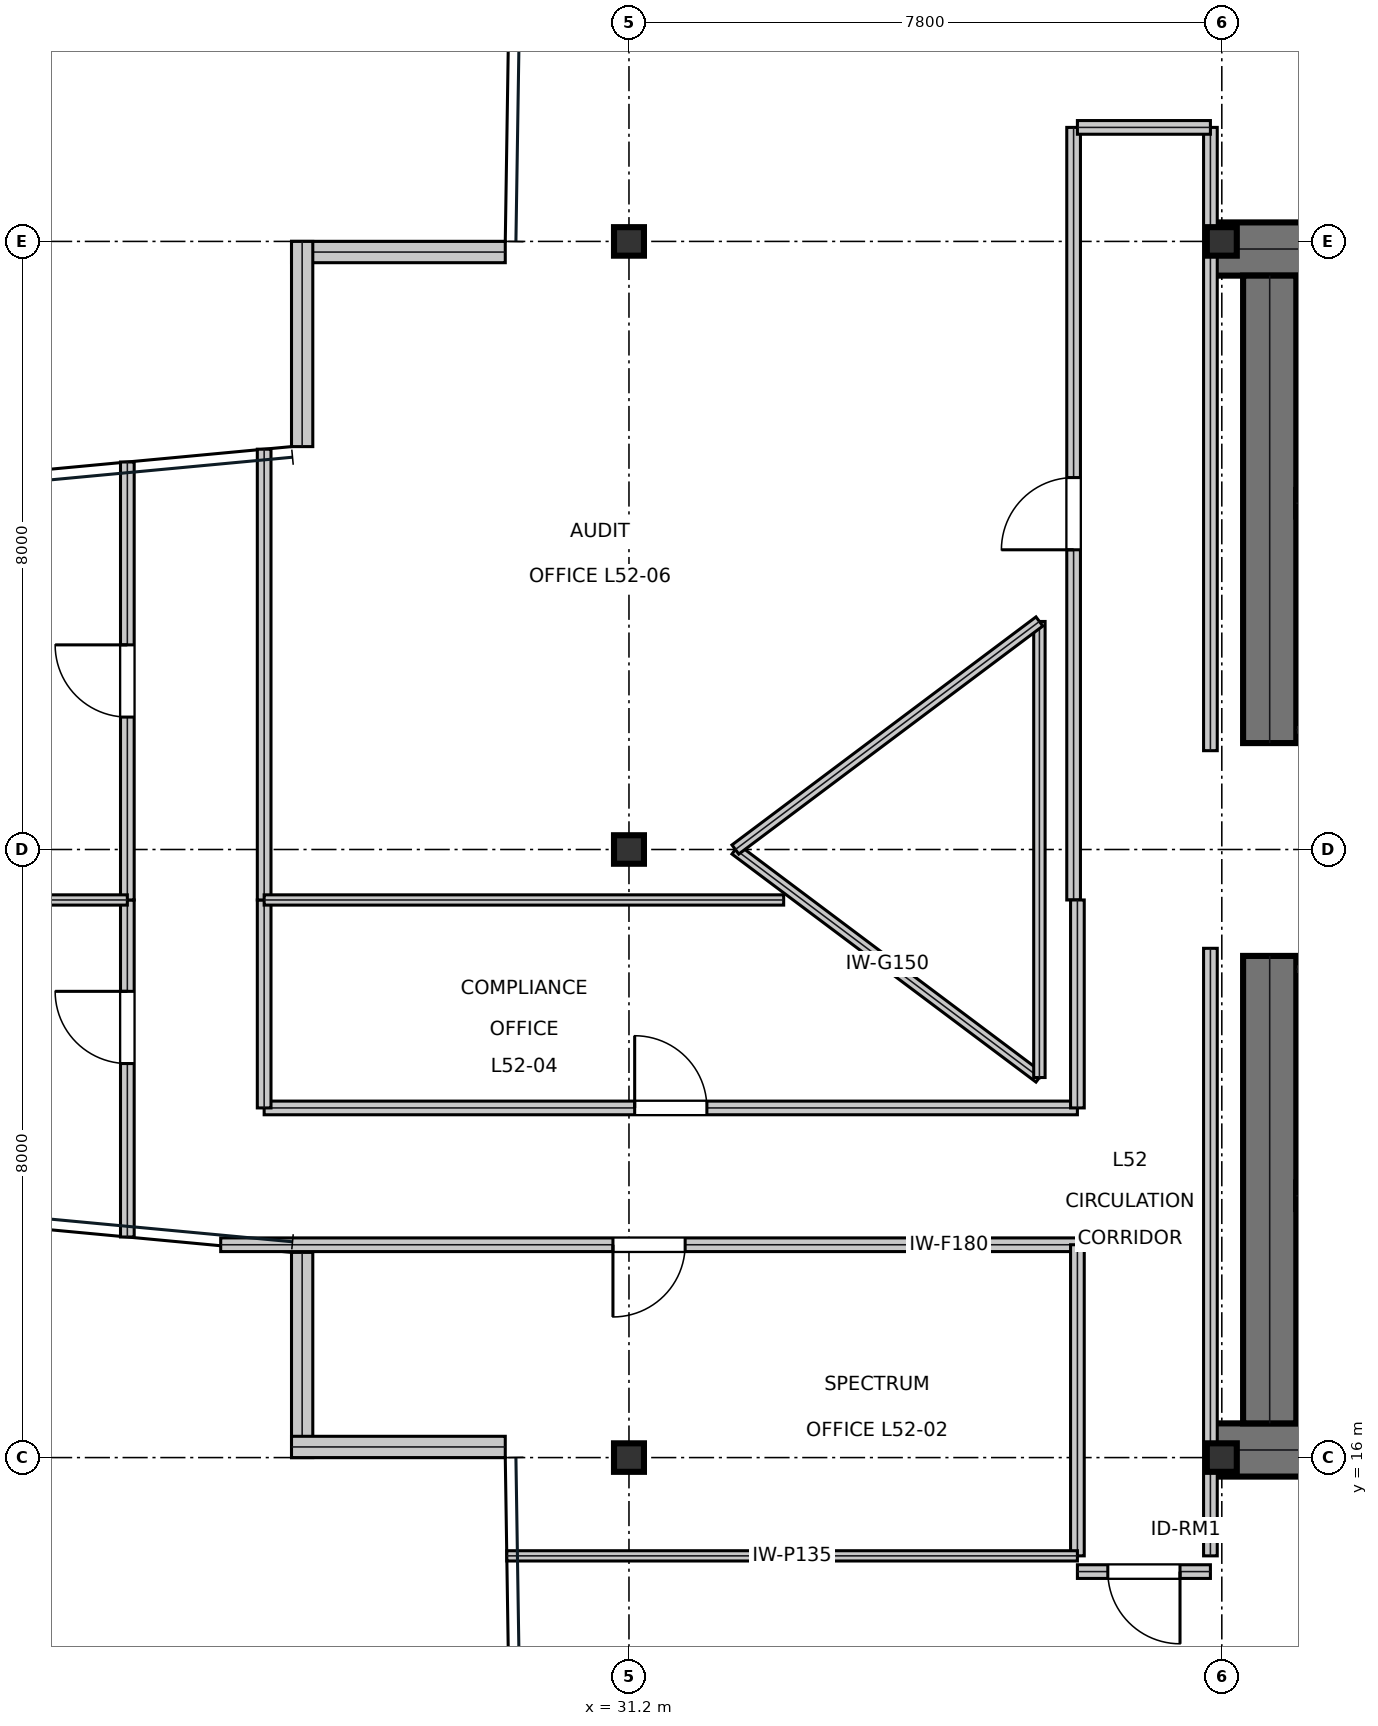
"""IFC4 building model, lengths in metres.
Left out: names, types, materials, properties, quantities, classifications, styles, units other than length and angle.
Written with IfcOpenShell. Run it as: python <this file> out.ifc"""

import sys

from ifc_helpers import new_model, si_unit, direction, frame, frame_2d, origin, origin_2d, place, context, subcontext, project, spatial, rectangle, i_section, extrude, element, fill, save


model = new_model("IFC4")
c1 = context("Model", 3, precision=1e-05, world=origin(), true_north=direction((0.0, 1.0)))
c2 = subcontext(c1, "Body", "Model", "MODEL_VIEW")
j1 = project(units=[si_unit("LENGTHUNIT", "METRE"), si_unit("PLANEANGLEUNIT", "RADIAN")], contexts=[c1])
p1 = place(None, origin())
s1 = spatial("IfcSite", under=j1, at=p1, CompositionType="ELEMENT")
p2 = place(p1, origin())
s2 = spatial("IfcBuilding", under=s1, at=p2, CompositionType="ELEMENT")
p3 = place(p2, frame((0.0, 0.0, 224.25)))
s3 = spatial("IfcBuildingStorey", under=s2, at=p3, CompositionType="ELEMENT", Elevation=224.25)
for number, where, z_axis, x_axis in (
    (1, (38.8, 31.9, 0.0), (0.0, 0.0, 1.0), (1.0, 0.0, 0.0)),
    (2, (38.8, 16.1, 0.0), (0.0, 0.0, 1.0), (1.0, 0.0, 0.0)),
):
    element("IfcWall", number, at=place(p3, frame(where, z_axis=z_axis, x_axis=x_axis)), inside=s3, PredefinedType="SHEAR", context=c2, shape_type="SweptSolid", body=[
        extrude(rectangle(XDim=16.0, YDim=0.7, at=frame_2d((8.0, 0.0))), origin(), (0.0, 0.0, 1.0), 3.79),
    ])
for number, where, z_axis, x_axis in (
    (3, (39.63, 16.45, 0.0), (0.0, 0.0, 1.0), (0.0, 1.0, 0.0)),
    (4, (39.63, 25.4, 0.0), (0.0, 0.0, 1.0), (0.0, 1.0, 0.0)),
):
    element("IfcWall", number, at=place(p3, frame(where, z_axis=z_axis, x_axis=x_axis)), inside=s3, PredefinedType="SHEAR", context=c2, shape_type="SweptSolid", body=[
        extrude(rectangle(XDim=6.15, YDim=0.7, at=frame_2d((3.075, 0.0))), origin(), (0.0, 0.0, 1.0), 3.79),
    ])
p4 = place(p3, frame((39.98, 28.555, 0.0), z_axis=(0.0, 0.0, 1.0), x_axis=(1.0, 0.0, 0.0)))
e5 = element("IfcWall", 5, at=p4, inside=s3, PredefinedType="SHEAR", context=c2, shape_type="SweptSolid", body=[
    extrude(rectangle(XDim=7.71, YDim=0.35, at=frame_2d((3.855, 0.0))), origin(), (0.0, 0.0, 1.0), 3.79),
])
p5 = place(p4, frame((0.25, 0.0, 0.0)))
e6 = element("IfcOpeningElement", 6, at=p5, cuts=e5, PredefinedType="OPENING", context=c2, shape_type="SweptSolid", body=[
    extrude(rectangle(XDim=1.1, YDim=2.15, at=frame_2d((0.55, 1.075))), frame((0.0, 0.185, 0.0), z_axis=(0.0, -1.0, 0.0), x_axis=(1.0, 0.0, 0.0)), (0.0, 0.0, 1.0), 0.37),
])
p6 = place(p3, frame((39.98, 19.445, 0.0), z_axis=(0.0, 0.0, 1.0), x_axis=(1.0, 0.0, 0.0)))
e7 = element("IfcWall", 7, at=p6, inside=s3, PredefinedType="SHEAR", context=c2, shape_type="SweptSolid", body=[
    extrude(rectangle(XDim=7.71, YDim=0.35, at=frame_2d((3.855, 0.0))), origin(), (0.0, 0.0, 1.0), 3.79),
])
p7 = place(p6, frame((0.25, 0.0, 0.0)))
e8 = element("IfcOpeningElement", 8, at=p7, cuts=e7, PredefinedType="OPENING", context=c2, shape_type="SweptSolid", body=[
    extrude(rectangle(XDim=1.1, YDim=2.15, at=frame_2d((0.55, 1.075))), frame((0.0, 0.185, 0.0), z_axis=(0.0, -1.0, 0.0), x_axis=(1.0, 0.0, 0.0)), (0.0, 0.0, 1.0), 0.37),
])
for number, where, z_axis, x_axis in (
    (9, (31.2, 16.0, 0.0), (0.0, 0.0, 1.0), (1.0, 0.0, 0.0)),
    (10, (31.2, 24.0, 0.0), (0.0, 0.0, 1.0), (1.0, 0.0, 0.0)),
    (11, (31.2, 32.0, 0.0), (0.0, 0.0, 1.0), (1.0, 0.0, 0.0)),
    (12, (39.0, 16.0, 0.0), (0.0, 0.0, 1.0), (1.0, 0.0, 0.0)),
    (13, (39.0, 32.0, 0.0), (0.0, 0.0, 1.0), (1.0, 0.0, 0.0)),
):
    element("IfcColumn", number, at=place(p3, frame(where, z_axis=z_axis, x_axis=x_axis)), inside=s3, PredefinedType="COLUMN", context=c2, shape_type="SweptSolid", body=[
        extrude(i_section(OverallWidth=0.394, OverallDepth=0.375, WebThickness=0.017, FlangeThickness=0.028, at=origin_2d()), origin(), (0.0, 0.0, 1.0), 4.044),
    ])
p8 = place(p3, frame((29.573, 31.86, 0.0), z_axis=(0.0, 0.0, 1.0), x_axis=(-1.0, 0.0, 0.0)))
e14 = element("IfcWall", 14, at=p8, inside=s3, PredefinedType="STANDARD", context=c2, shape_type="SweptSolid", body=[
    extrude(rectangle(XDim=2.812, YDim=0.28, at=frame_2d((1.406, 0.0))), origin(), (0.0, 0.0, 1.0), 3.79),
])
for number, where, z_axis, x_axis in (
    (15, (26.9, 32.0, 0.0), (0.0, 0.0, 1.0), (0.0, -1.0, 0.0)),
    (16, (26.9, 18.7, 0.0), (0.0, 0.0, 1.0), (0.0, -1.0, 0.0)),
):
    element("IfcWall", number, at=place(p3, frame(where, z_axis=z_axis, x_axis=x_axis)), inside=s3, PredefinedType="STANDARD", context=c2, shape_type="SweptSolid", body=[
        extrude(rectangle(XDim=2.7, YDim=0.28, at=frame_2d((1.35, 0.0))), origin(), (0.0, 0.0, 1.0), 3.319),
    ])
p9 = place(p3, frame((26.76, 16.14, 0.0), z_axis=(0.0, 0.0, 1.0), x_axis=(1.0, 0.0, 0.0)))
e17 = element("IfcWall", 17, at=p9, inside=s3, PredefinedType="STANDARD", context=c2, shape_type="SweptSolid", body=[
    extrude(rectangle(XDim=2.812, YDim=0.28, at=frame_2d((1.406, 0.0))), origin(), (0.0, 0.0, 1.0), 3.79),
])
p10 = place(p3, frame((39.98, 25.575, 0.0), z_axis=(0.0, 0.0, 1.0), x_axis=(1.0, 0.0, 0.0)))
e18 = element("IfcWall", 18, at=p10, inside=s3, PredefinedType="PARTITIONING", context=c2, shape_type="SweptSolid", body=[
    extrude(rectangle(XDim=5.9, YDim=0.15, at=frame_2d((2.95, 0.0))), origin(), (0.0, 0.0, 1.0), 3.79),
])
p11 = place(p10, frame((2.35, 0.0, 0.0)))
e19 = element("IfcOpeningElement", 19, at=p11, cuts=e18, PredefinedType="OPENING", context=c2, shape_type="SweptSolid", body=[
    extrude(rectangle(XDim=1.05, YDim=2.15, at=frame_2d((0.525, 1.075))), frame((0.0, 0.085, 0.0), z_axis=(0.0, -1.0, 0.0), x_axis=(1.0, 0.0, 0.0)), (0.0, 0.0, 1.0), 0.17),
])
p12 = place(p3, frame((39.98, 22.425, 0.0), z_axis=(0.0, 0.0, 1.0), x_axis=(1.0, 0.0, 0.0)))
e20 = element("IfcWall", 20, at=p12, inside=s3, PredefinedType="PARTITIONING", context=c2, shape_type="SweptSolid", body=[
    extrude(rectangle(XDim=5.9, YDim=0.15, at=frame_2d((2.95, 0.0))), origin(), (0.0, 0.0, 1.0), 3.79),
])
p13 = place(p12, frame((2.35, 0.0, 0.0)))
e21 = element("IfcOpeningElement", 21, at=p13, cuts=e20, PredefinedType="OPENING", context=c2, shape_type="SweptSolid", body=[
    extrude(rectangle(XDim=1.05, YDim=2.15, at=frame_2d((0.525, 1.075))), frame((0.0, 0.085, 0.0), z_axis=(0.0, -1.0, 0.0), x_axis=(1.0, 0.0, 0.0)), (0.0, 0.0, 1.0), 0.17),
])
p14 = place(p3, frame((37.1, 14.5, 0.0), z_axis=(0.0, 0.0, 1.0), x_axis=(1.0, 0.0, 0.0)))
e22 = element("IfcWall", 22, at=p14, inside=s3, PredefinedType="SOLIDWALL", context=c2, shape_type="SweptSolid", body=[
    extrude(rectangle(XDim=1.75, YDim=0.18, at=frame_2d((0.875, 0.0))), origin(), (0.0, 0.0, 1.0), 3.241),
])
p15 = place(p14, frame((0.4, 0.0, 0.0)))
e23 = element("IfcOpeningElement", 23, at=p15, cuts=e22, PredefinedType="OPENING", context=c2, shape_type="SweptSolid", body=[
    extrude(rectangle(XDim=0.95, YDim=2.15, at=frame_2d((0.475, 1.075))), frame((0.0, 0.1, 0.0), z_axis=(0.0, -1.0, 0.0), x_axis=(1.0, 0.0, 0.0)), (0.0, 0.0, 1.0), 0.2),
])
p16 = place(p3, frame((25.828, 18.8, 0.0), z_axis=(0.0, 0.0, 1.0), x_axis=(1.0, 0.0, 0.0)))
e24 = element("IfcWall", 24, at=p16, inside=s3, PredefinedType="SOLIDWALL", context=c2, shape_type="SweptSolid", body=[
    extrude(rectangle(XDim=11.272, YDim=0.18, at=frame_2d((5.636, 0.0))), origin(), (0.0, 0.0, 1.0), 3.241),
])
p17 = place(p16, frame((5.161, 0.0, 0.0)))
e25 = element("IfcOpeningElement", 25, at=p17, cuts=e24, PredefinedType="OPENING", context=c2, shape_type="SweptSolid", body=[
    extrude(rectangle(XDim=0.95, YDim=2.15, at=frame_2d((0.475, 1.075))), frame((0.0, 0.1, 0.0), z_axis=(0.0, -1.0, 0.0), x_axis=(1.0, 0.0, 0.0)), (0.0, 0.0, 1.0), 0.2),
])
p18 = place(p3, frame((24.6, 18.902, 0.0), z_axis=(0.0, 0.0, 1.0), x_axis=(0.0, 1.0, 0.0)))
e26 = element("IfcWall", 26, at=p18, inside=s3, PredefinedType="SOLIDWALL", context=c2, shape_type="SweptSolid", body=[
    extrude(rectangle(XDim=4.434, YDim=0.18, at=frame_2d((2.217, 0.0))), origin(), (0.0, 0.0, 1.0), 3.241),
])
p19 = place(p18, frame((2.282, 0.0, 0.0)))
e27 = element("IfcOpeningElement", 27, at=p19, cuts=e26, PredefinedType="OPENING", context=c2, shape_type="SweptSolid", body=[
    extrude(rectangle(XDim=0.95, YDim=2.15, at=frame_2d((0.475, 1.075))), frame((0.0, 0.1, 0.0), z_axis=(0.0, -1.0, 0.0), x_axis=(1.0, 0.0, 0.0)), (0.0, 0.0, 1.0), 0.2),
])
p20 = place(p3, frame((26.4, 20.6, 0.0), z_axis=(0.0, 0.0, 1.0), x_axis=(1.0, 0.0, 0.0)))
e28 = element("IfcWall", 28, at=p20, inside=s3, PredefinedType="SOLIDWALL", context=c2, shape_type="SweptSolid", body=[
    extrude(rectangle(XDim=10.7, YDim=0.18, at=frame_2d((5.35, 0.0))), origin(), (0.0, 0.0, 1.0), 3.241),
])
p21 = place(p20, frame((4.875, 0.0, 0.0)))
e29 = element("IfcOpeningElement", 29, at=p21, cuts=e28, PredefinedType="OPENING", context=c2, shape_type="SweptSolid", body=[
    extrude(rectangle(XDim=0.95, YDim=2.15, at=frame_2d((0.475, 1.075))), frame((0.0, 0.1, 0.0), z_axis=(0.0, -1.0, 0.0), x_axis=(1.0, 0.0, 0.0)), (0.0, 0.0, 1.0), 0.2),
])
p22 = place(p3, frame((24.6, 23.336, 0.0), z_axis=(0.0, 0.0, 1.0), x_axis=(0.0, 1.0, 0.0)))
e30 = element("IfcWall", 30, at=p22, inside=s3, PredefinedType="SOLIDWALL", context=c2, shape_type="SweptSolid", body=[
    extrude(rectangle(XDim=5.762, YDim=0.18, at=frame_2d((2.881, 0.0))), origin(), (0.0, 0.0, 1.0), 3.241),
])
p23 = place(p22, frame((2.406, 0.0, 0.0)))
e31 = element("IfcOpeningElement", 31, at=p23, cuts=e30, PredefinedType="OPENING", context=c2, shape_type="SweptSolid", body=[
    extrude(rectangle(XDim=0.95, YDim=2.15, at=frame_2d((0.475, 1.075))), frame((0.0, 0.1, 0.0), z_axis=(0.0, -1.0, 0.0), x_axis=(1.0, 0.0, 0.0)), (0.0, 0.0, 1.0), 0.2),
])
p24 = place(p3, frame((37.05, 23.336, 0.0), z_axis=(0.0, 0.0, 1.0), x_axis=(0.0, 1.0, 0.0)))
e32 = element("IfcWall", 32, at=p24, inside=s3, PredefinedType="SOLIDWALL", context=c2, shape_type="SweptSolid", body=[
    extrude(rectangle(XDim=10.164, YDim=0.18, at=frame_2d((5.082, 0.0))), origin(), (0.0, 0.0, 1.0), 3.241),
])
p25 = place(p24, frame((4.607, 0.0, 0.0)))
e33 = element("IfcOpeningElement", 33, at=p25, cuts=e32, PredefinedType="OPENING", context=c2, shape_type="SweptSolid", body=[
    extrude(rectangle(XDim=0.95, YDim=2.15, at=frame_2d((0.475, 1.075))), frame((0.0, 0.1, 0.0), z_axis=(0.0, -1.0, 0.0), x_axis=(1.0, 0.0, 0.0)), (0.0, 0.0, 1.0), 0.2),
])
p26 = place(p3, frame((38.85, 14.707, 0.0), z_axis=(0.0, 0.0, 1.0), x_axis=(0.0, 1.0, 0.0)))
e34 = element("IfcWall", 34, at=p26, inside=s3, PredefinedType="SOLIDWALL", context=c2, shape_type="SweptSolid", body=[
    extrude(rectangle(XDim=7.993, YDim=0.18, at=frame_2d((3.997, 0.0))), origin(), (0.0, 0.0, 1.0), 3.241),
])
p27 = place(p3, frame((37.1, 14.707, 0.0), z_axis=(0.0, 0.0, 1.0), x_axis=(0.0, 1.0, 0.0)))
e35 = element("IfcWall", 35, at=p27, inside=s3, PredefinedType="SOLIDWALL", context=c2, shape_type="SweptSolid", body=[
    extrude(rectangle(XDim=4.093, YDim=0.18, at=frame_2d((2.046, 0.0))), origin(), (0.0, 0.0, 1.0), 3.241),
])
p28 = place(p3, frame((26.4, 20.6, 0.0), z_axis=(0.0, 0.0, 1.0), x_axis=(0.0, 1.0, 0.0)))
e36 = element("IfcWall", 36, at=p28, inside=s3, PredefinedType="SOLIDWALL", context=c2, shape_type="SweptSolid", body=[
    extrude(rectangle(XDim=2.736, YDim=0.18, at=frame_2d((1.368, 0.0))), origin(), (0.0, 0.0, 1.0), 3.241),
])
p29 = place(p3, frame((37.1, 20.6, 0.0), z_axis=(0.0, 0.0, 1.0), x_axis=(0.0, 1.0, 0.0)))
e37 = element("IfcWall", 37, at=p29, inside=s3, PredefinedType="SOLIDWALL", context=c2, shape_type="SweptSolid", body=[
    extrude(rectangle(XDim=2.736, YDim=0.18, at=frame_2d((1.368, 0.0))), origin(), (0.0, 0.0, 1.0), 3.79),
])
p30 = place(p3, frame((38.85, 25.3, 0.0), z_axis=(0.0, 0.0, 1.0), x_axis=(0.0, 1.0, 0.0)))
e38 = element("IfcWall", 38, at=p30, inside=s3, PredefinedType="SOLIDWALL", context=c2, shape_type="SweptSolid", body=[
    extrude(rectangle(XDim=8.2, YDim=0.18, at=frame_2d((4.1, 0.0))), origin(), (0.0, 0.0, 1.0), 3.241),
])
p31 = place(p3, frame((26.4, 23.336, 0.0), z_axis=(0.0, 0.0, 1.0), x_axis=(0.0, 1.0, 0.0)))
e39 = element("IfcWall", 39, at=p31, inside=s3, PredefinedType="SOLIDWALL", context=c2, shape_type="SweptSolid", body=[
    extrude(rectangle(XDim=5.931, YDim=0.18, at=frame_2d((2.965, 0.0))), origin(), (0.0, 0.0, 1.0), 3.241),
])
p32 = place(p3, frame((37.1, 33.5, 0.0), z_axis=(0.0, 0.0, 1.0), x_axis=(1.0, 0.0, 0.0)))
e40 = element("IfcWall", 40, at=p32, inside=s3, PredefinedType="SOLIDWALL", context=c2, shape_type="SweptSolid", body=[
    extrude(rectangle(XDim=1.75, YDim=0.18, at=frame_2d((0.875, 0.0))), origin(), (0.0, 0.0, 1.0), 3.241),
])
p33 = place(p3, frame((29.592, 14.707, 0.0), z_axis=(0.0, 0.0, 1.0), x_axis=(1.0, 0.0, 0.0)))
e41 = element("IfcWall", 41, at=p33, inside=s3, PredefinedType="PARTITIONING", context=c2, shape_type="SweptSolid", body=[
    extrude(rectangle(XDim=7.508, YDim=0.135, at=frame_2d((3.754, 0.0))), origin(), (0.0, 0.0, 1.0), 3.319),
])
p34 = place(p3, frame((13.54, 23.336, 0.0), z_axis=(0.0, 0.0, 1.0), x_axis=(1.0, 0.0, 0.0)))
e42 = element("IfcWall", 42, at=p34, inside=s3, PredefinedType="PARTITIONING", context=c2, shape_type="SweptSolid", body=[
    extrude(rectangle(XDim=11.06, YDim=0.135, at=frame_2d((5.53, 0.0))), origin(), (0.0, 0.0, 1.0), 3.319),
])
p35 = place(p3, frame((26.4, 23.336, 0.0), z_axis=(0.0, 0.0, 1.0), x_axis=(1.0, 0.0, 0.0)))
e43 = element("IfcWall", 43, at=p35, inside=s3, PredefinedType="PARTITIONING", context=c2, shape_type="SweptSolid", body=[
    extrude(rectangle(XDim=6.835, YDim=0.135, at=frame_2d((3.418, 0.0))), origin(), (0.0, 0.0, 1.0), 3.241),
])
p36 = place(p3, frame((32.6, 24.0, 0.0), z_axis=(0.0, 0.0, 1.0), x_axis=(0.8, -0.6, 0.0)))
e44 = element("IfcWall", 44, at=p36, inside=s3, PredefinedType="MOVABLE", context=c2, shape_type="SweptSolid", body=[
    extrude(rectangle(XDim=5.0, YDim=0.15, at=frame_2d((2.5, 0.0))), origin(), (0.0, 0.0, 1.0), 3.79),
])
p37 = place(p3, frame((36.6, 21.0, 0.0), z_axis=(0.0, 0.0, 1.0), x_axis=(0.0, 1.0, 0.0)))
e45 = element("IfcWall", 45, at=p37, inside=s3, PredefinedType="MOVABLE", context=c2, shape_type="SweptSolid", body=[
    extrude(rectangle(XDim=6.0, YDim=0.15, at=frame_2d((3.0, 0.0))), origin(), (0.0, 0.0, 1.0), 3.79),
])
p38 = place(p3, frame((36.6, 27.0, 0.0), z_axis=(0.0, 0.0, 1.0), x_axis=(-0.8, -0.6, 0.0)))
e46 = element("IfcWall", 46, at=p38, inside=s3, PredefinedType="MOVABLE", context=c2, shape_type="SweptSolid", body=[
    extrude(rectangle(XDim=5.0, YDim=0.15, at=frame_2d((2.5, 0.0))), origin(), (0.0, 0.0, 1.0), 3.79),
])
p39 = place(p15, frame((0.95, 0.0, 0.0), z_axis=(0.0, 0.0, 1.0), x_axis=(-1.0, 0.0, 0.0)))
e47 = element("IfcDoor", 47, at=p39, inside=s3, OperationType="SINGLE_SWING_LEFT", PredefinedType="DOOR", context=c2, shape_type="SweptSolid", body=[
    extrude(rectangle(XDim=0.95, YDim=2.15, at=frame_2d((0.475, 1.075))), frame((0.0, 0.025, 0.0), z_axis=(0.0, -1.0, 0.0), x_axis=(1.0, 0.0, 0.0)), (0.0, 0.0, 1.0), 0.05),
])
fill(e23, e47)
p40 = place(p17, frame((0.95, 0.0, 0.0), z_axis=(0.0, 0.0, 1.0), x_axis=(-1.0, 0.0, 0.0)))
e48 = element("IfcDoor", 48, at=p40, inside=s3, OperationType="SINGLE_SWING_RIGHT", PredefinedType="DOOR", context=c2, shape_type="SweptSolid", body=[
    extrude(rectangle(XDim=0.95, YDim=2.15, at=frame_2d((0.475, 1.075))), frame((0.0, 0.025, 0.0), z_axis=(0.0, -1.0, 0.0), x_axis=(1.0, 0.0, 0.0)), (0.0, 0.0, 1.0), 0.05),
])
fill(e25, e48)
p41 = place(p19, origin())
e49 = element("IfcDoor", 49, at=p41, inside=s3, OperationType="SINGLE_SWING_RIGHT", PredefinedType="DOOR", context=c2, shape_type="SweptSolid", body=[
    extrude(rectangle(XDim=0.95, YDim=2.15, at=frame_2d((0.475, 1.075))), frame((0.0, 0.025, 0.0), z_axis=(0.0, -1.0, 0.0), x_axis=(1.0, 0.0, 0.0)), (0.0, 0.0, 1.0), 0.05),
])
fill(e27, e49)
p42 = place(p21, origin())
e50 = element("IfcDoor", 50, at=p42, inside=s3, OperationType="SINGLE_SWING_LEFT", PredefinedType="DOOR", context=c2, shape_type="SweptSolid", body=[
    extrude(rectangle(XDim=0.95, YDim=2.15, at=frame_2d((0.475, 1.075))), frame((0.0, 0.025, 0.0), z_axis=(0.0, -1.0, 0.0), x_axis=(1.0, 0.0, 0.0)), (0.0, 0.0, 1.0), 0.05),
])
fill(e29, e50)
p43 = place(p23, origin())
e51 = element("IfcDoor", 51, at=p43, inside=s3, OperationType="SINGLE_SWING_RIGHT", PredefinedType="DOOR", context=c2, shape_type="SweptSolid", body=[
    extrude(rectangle(XDim=0.95, YDim=2.15, at=frame_2d((0.475, 1.075))), frame((0.0, 0.025, 0.0), z_axis=(0.0, -1.0, 0.0), x_axis=(1.0, 0.0, 0.0)), (0.0, 0.0, 1.0), 0.05),
])
fill(e31, e51)
p44 = place(p25, origin())
e52 = element("IfcDoor", 52, at=p44, inside=s3, OperationType="SINGLE_SWING_LEFT", PredefinedType="DOOR", context=c2, shape_type="SweptSolid", body=[
    extrude(rectangle(XDim=0.95, YDim=2.15, at=frame_2d((0.475, 1.075))), frame((0.0, 0.025, 0.0), z_axis=(0.0, -1.0, 0.0), x_axis=(1.0, 0.0, 0.0)), (0.0, 0.0, 1.0), 0.05),
])
fill(e33, e52)
save(model, sys.argv[1])
